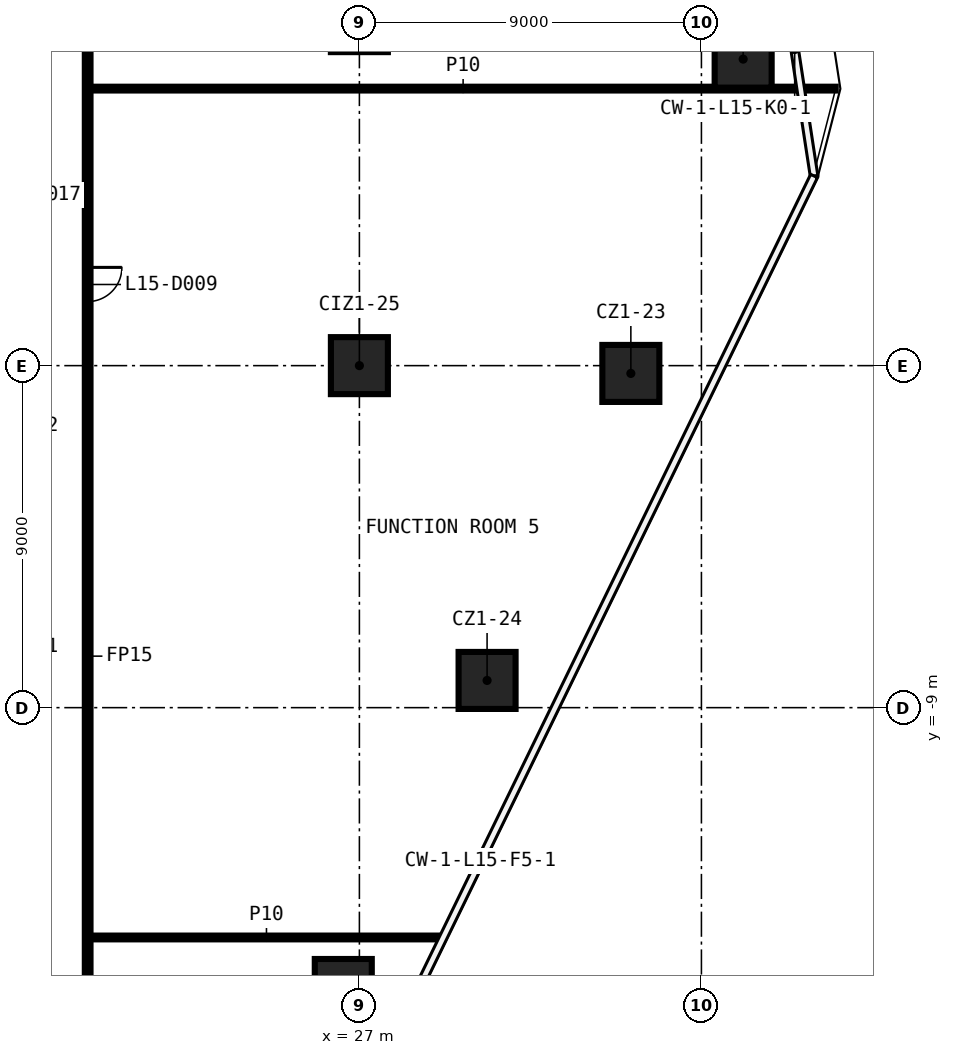
"""IFC4 building model, lengths in metres.
Left out: names, types, materials, properties, quantities, classifications, styles, units other than length and angle.
Written with IfcOpenShell. Run it as: python <this file> out.ifc"""

import sys

from ifc_helpers import new_model, si_unit, direction, frame, frame_2d, origin, origin_2d, place, context, subcontext, project, spatial, rectangle, extrude, element, fill, save


model = new_model("IFC4")
c1 = context("Model", 3, precision=1e-05, world=origin(), true_north=direction((0.0, 1.0)))
c2 = subcontext(c1, "Body", "Model", "MODEL_VIEW")
j1 = project(units=[si_unit("LENGTHUNIT", "METRE"), si_unit("PLANEANGLEUNIT", "RADIAN")], contexts=[c1])
p1 = place(None, origin())
s1 = spatial("IfcSite", under=j1, at=p1, CompositionType="ELEMENT")
p2 = place(p1, origin())
s2 = spatial("IfcBuilding", under=s1, at=p2, CompositionType="ELEMENT")
p3 = place(p2, frame((0.0, 0.0, 77.3)))
s3 = spatial("IfcBuildingStorey", under=s2, at=p3, CompositionType="ELEMENT", Elevation=77.3)
for number, where, z_axis, x_axis in (
    (1, (37.098, 8.066, 0.0), (0.0, 0.0, 1.0), (1.0, 0.0, 0.0)),
    (2, (34.143, -0.205, 0.0), (0.0, 0.0, 1.0), (1.0, 0.0, 0.0)),
    (3, (30.36, -8.284, 0.0), (0.0, 0.0, 1.0), (1.0, 0.0, 0.0)),
    (4, (26.576, -16.364, 0.0), (0.0, 0.0, 1.0), (1.0, 0.0, 0.0)),
    (5, (27.0, 0.0, 0.0), (0.0, 0.0, 1.0), (1.0, 0.0, 0.0)),
):
    element("IfcColumn", number, at=place(p3, frame(where, z_axis=z_axis, x_axis=x_axis)), inside=s3, PredefinedType="COLUMN", context=c2, shape_type="SweptSolid", body=[
        extrude(rectangle(XDim=1.5, YDim=1.5, at=origin_2d()), origin(), (0.0, 0.0, 1.0), 3.3),
    ])
p4 = place(p3, frame((19.925, -15.048, 0.0), z_axis=(0.0, 0.0, 1.0), x_axis=(1.0, 0.0, 0.0)))
e6 = element("IfcWall", 6, at=p4, inside=s3, PredefinedType="PARTITIONING", context=c2, shape_type="SweptSolid", body=[
    extrude(rectangle(XDim=9.26, YDim=0.1, at=frame_2d((4.63, 0.0))), origin(), (0.0, 0.0, 1.0), 3.3),
])
p5 = place(p3, frame((19.925, 7.29, 0.0), z_axis=(0.0, 0.0, 1.0), x_axis=(1.0, 0.0, 0.0)))
e7 = element("IfcWall", 7, at=p5, inside=s3, PredefinedType="PARTITIONING", context=c2, shape_type="SweptSolid", body=[
    extrude(rectangle(XDim=19.609, YDim=0.1, at=frame_2d((9.804, 0.0))), origin(), (0.0, 0.0, 1.0), 3.3),
])
p6 = place(p3, frame((19.85, 16.775, 0.0), z_axis=(0.0, 0.0, 1.0), x_axis=(0.0, -1.0, 0.0)))
e8 = element("IfcWall", 8, at=p6, inside=s3, PredefinedType="PARTITIONING", context=c2, shape_type="SweptSolid", body=[
    extrude(rectangle(XDim=33.55, YDim=0.15, at=frame_2d((16.775, 0.0))), origin(), (0.0, 0.0, 1.0), 3.3),
])
p7 = place(p6, frame((14.19, 0.0, 0.0)))
e9 = element("IfcOpeningElement", 9, at=p7, cuts=e8, PredefinedType="OPENING", context=c2, shape_type="SweptSolid", body=[
    extrude(rectangle(XDim=0.9, YDim=2.1, at=frame_2d((0.45, 1.05))), frame((0.0, 0.085, 0.0), z_axis=(0.0, -1.0, 0.0), x_axis=(1.0, 0.0, 0.0)), (0.0, 0.0, 1.0), 0.17),
])
p8 = place(p7, origin())
e10 = element("IfcDoor", 10, at=p8, inside=s3, OperationType="SINGLE_SWING_RIGHT", PredefinedType="DOOR", context=c2, shape_type="SweptSolid", body=[
    extrude(rectangle(XDim=0.9, YDim=2.1, at=frame_2d((0.45, 1.05))), frame((0.0, 0.025, 0.0), z_axis=(0.0, -1.0, 0.0), x_axis=(1.0, 0.0, 0.0)), (0.0, 0.0, 1.0), 0.05),
])
fill(e9, e10)
save(model, sys.argv[1])
